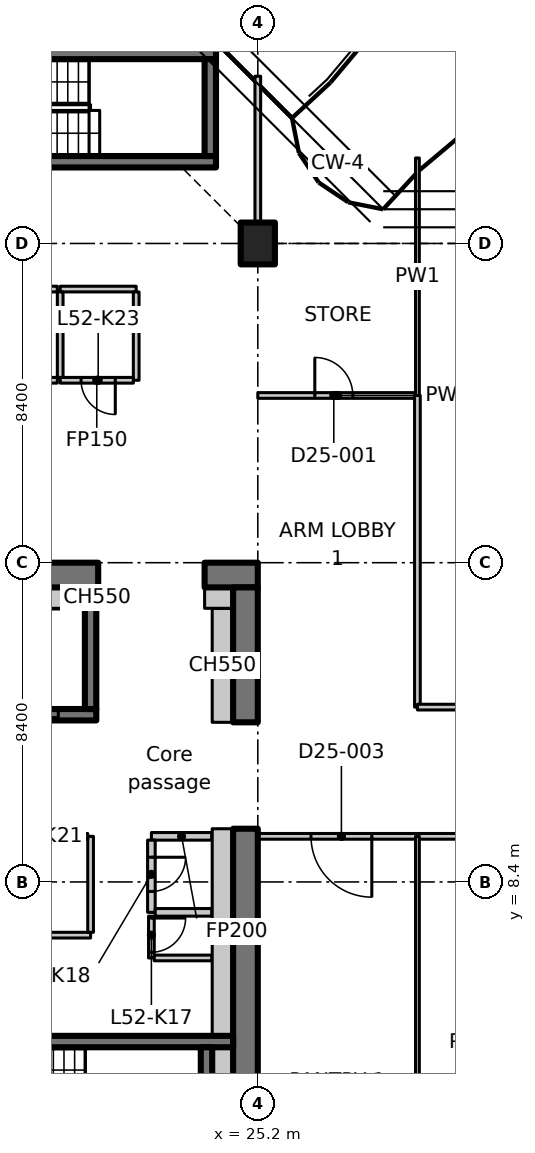
"""IFC4 building model, lengths in metres.
Left out: names, types, materials, properties, quantities, classifications, styles, units other than length and angle.
Written with IfcOpenShell. Run it as: python <this file> out.ifc"""

import sys

from ifc_helpers import new_model, si_unit, direction, frame, frame_2d, origin, origin_2d, place, context, subcontext, project, spatial, polyline, rectangle, outline, extrude, element, fill, save


model = new_model("IFC4")
c1 = context("Model", 3, precision=1e-05, world=origin(), true_north=direction((0.0, 1.0)))
c2 = subcontext(c1, "Body", "Model", "MODEL_VIEW")
j1 = project(units=[si_unit("LENGTHUNIT", "METRE"), si_unit("PLANEANGLEUNIT", "RADIAN")], contexts=[c1])
p1 = place(None, origin())
s1 = spatial("IfcSite", under=j1, at=p1, CompositionType="ELEMENT")
p2 = place(p1, origin())
s2 = spatial("IfcBuilding", under=s1, at=p2, CompositionType="ELEMENT")
p3 = place(p2, frame((0.0, 0.0, 206.4)))
s3 = spatial("IfcBuildingStorey", under=s2, at=p3, CompositionType="ELEMENT", Elevation=206.4)
p4 = place(p3, frame((25.2, 25.2, 0.0), z_axis=(0.0, 0.0, 1.0), x_axis=(1.0, 0.0, 0.0)))
e1 = element("IfcColumn", 1, at=p4, inside=s3, PredefinedType="COLUMN", context=c2, shape_type="SweptSolid", body=[
    extrude(rectangle(XDim=0.9, YDim=1.1, at=origin_2d()), origin(), (0.0, 0.0, 1.0), 4.2),
])
p5 = place(p3, frame((-1.1, 16.475, 0.0), z_axis=(0.0, 0.0, 1.0), x_axis=(1.0, 0.0, 0.0)))
e2 = element("IfcWall", 2, at=p5, inside=s3, PredefinedType="SHEAR", context=c2, shape_type="SweptSolid", body=[
    extrude(rectangle(XDim=22.1, YDim=0.65, at=frame_2d((11.05, 0.0))), origin(), (0.0, 0.0, 1.0), 4.2),
])
p6 = place(p5, frame((3.15, 0.0, 0.0)))
e3 = element("IfcOpeningElement", 3, at=p6, cuts=e2, PredefinedType="OPENING", context=c2, shape_type="SweptSolid", body=[
    extrude(rectangle(XDim=1.1, YDim=2.3, at=frame_2d((0.55, 1.15))), frame((0.0, 0.335, 0.0), z_axis=(0.0, -1.0, 0.0), x_axis=(1.0, 0.0, 0.0)), (0.0, 0.0, 1.0), 0.67),
])
p7 = place(p3, frame((23.8, 16.475, 0.0), z_axis=(0.0, 0.0, 1.0), x_axis=(1.0, 0.0, 0.0)))
e4 = element("IfcWall", 4, at=p7, inside=s3, PredefinedType="SHEAR", context=c2, shape_type="SweptSolid", body=[
    extrude(rectangle(XDim=1.4, YDim=0.65, at=frame_2d((0.7, 0.0))), origin(), (0.0, 0.0, 1.0), 4.2),
])
p8 = place(p3, frame((24.875, 0.65, 0.0), z_axis=(0.0, 0.0, 1.0), x_axis=(0.0, 1.0, 0.0)))
e5 = element("IfcWall", 5, at=p8, inside=s3, PredefinedType="SHEAR", context=c2, shape_type="SweptSolid", body=[
    extrude(rectangle(XDim=9.15, YDim=0.65, at=frame_2d((4.575, 0.0))), origin(), (0.0, 0.0, 1.0), 4.2),
])
p9 = place(p3, frame((24.875, 12.6, 0.0), z_axis=(0.0, 0.0, 1.0), x_axis=(0.0, 1.0, 0.0)))
e6 = element("IfcWall", 6, at=p9, inside=s3, PredefinedType="SHEAR", context=c2, shape_type="SweptSolid", body=[
    extrude(rectangle(XDim=3.55, YDim=0.65, at=frame_2d((1.775, 0.0))), origin(), (0.0, 0.0, 1.0), 4.2),
])
p10 = place(p3, frame((24.275, 12.6, 0.0), z_axis=(0.0, 0.0, 1.0), x_axis=(0.0, 1.0, 0.0)))
e7 = element("IfcWall", 7, at=p10, inside=s3, PredefinedType="PARTITIONING", context=c2, shape_type="SweptSolid", body=[
    extrude(rectangle(XDim=3.0, YDim=0.55, at=frame_2d((1.5, 0.0))), origin(), (0.0, 0.0, 1.0), 4.2),
])
p11 = place(p3, frame((23.8, 15.875, 0.0), z_axis=(0.0, 0.0, 1.0), x_axis=(1.0, 0.0, 0.0)))
e8 = element("IfcWall", 8, at=p11, inside=s3, PredefinedType="PARTITIONING", context=c2, shape_type="SweptSolid", body=[
    extrude(rectangle(XDim=0.75, YDim=0.55, at=frame_2d((0.375, 0.0))), origin(), (0.0, 0.0, 1.0), 4.2),
])
p12 = place(p3, frame((17.85, 12.8, 0.0), z_axis=(0.0, 0.0, 1.0), x_axis=(1.0, 0.0, 0.0)))
e9 = element("IfcWall", 9, at=p12, inside=s3, PredefinedType="SHEAR", context=c2, shape_type="SweptSolid", body=[
    extrude(rectangle(XDim=3.1, YDim=0.3, at=frame_2d((1.55, 0.0))), origin(), (0.0, 0.0, 1.0), 4.2),
])
p13 = place(p12, frame((1.0, 0.0, 0.0)))
e10 = element("IfcOpeningElement", 10, at=p13, cuts=e9, PredefinedType="OPENING", context=c2, shape_type="SweptSolid", body=[
    extrude(rectangle(XDim=1.1, YDim=2.3, at=frame_2d((0.55, 1.15))), frame((0.0, 0.16, 0.0), z_axis=(0.0, -1.0, 0.0), x_axis=(1.0, 0.0, 0.0)), (0.0, 0.0, 1.0), 0.32),
])
p14 = place(p3, frame((20.8, 12.95, 0.0), z_axis=(0.0, 0.0, 1.0), x_axis=(0.0, 1.0, 0.0)))
e11 = element("IfcWall", 11, at=p14, inside=s3, PredefinedType="SHEAR", context=c2, shape_type="SweptSolid", body=[
    extrude(rectangle(XDim=3.2, YDim=0.3, at=frame_2d((1.6, 0.0))), origin(), (0.0, 0.0, 1.0), 4.2),
])
p15 = place(p3, frame((15.8, 4.2, 0.0), z_axis=(0.0, 0.0, 1.0), x_axis=(1.0, 0.0, 0.0)))
e12 = element("IfcWall", 12, at=p15, inside=s3, PredefinedType="SHEAR", context=c2, shape_type="SweptSolid", body=[
    extrude(rectangle(XDim=8.75, YDim=0.3, at=frame_2d((4.375, 0.0))), origin(), (0.0, 0.0, 1.0), 4.2),
])
p16 = place(p15, frame((0.4, 0.0, 0.0)))
e13 = element("IfcOpeningElement", 13, at=p16, cuts=e12, PredefinedType="OPENING", context=c2, shape_type="SweptSolid", body=[
    extrude(rectangle(XDim=1.0, YDim=2.1, at=frame_2d((0.5, 1.05))), frame((0.0, 0.16, 0.0), z_axis=(0.0, -1.0, 0.0), x_axis=(1.0, 0.0, 0.0)), (0.0, 0.0, 1.0), 0.32),
])
p17 = place(p3, frame((23.85, 1.5, 0.0), z_axis=(0.0, 0.0, 1.0), x_axis=(0.0, 1.0, 0.0)))
e14 = element("IfcWall", 14, at=p17, inside=s3, PredefinedType="SHEAR", context=c2, shape_type="SweptSolid", body=[
    extrude(rectangle(XDim=2.55, YDim=0.3, at=frame_2d((1.275, 0.0))), origin(), (0.0, 0.0, 1.0), 4.2),
])
for number, where, z_axis, x_axis in (
    (15, (15.9, 27.35, 0.0), (0.0, 0.0, 1.0), (1.0, 0.0, 0.0)),
    (16, (15.9, 30.2, 0.0), (0.0, 0.0, 1.0), (1.0, 0.0, 0.0)),
):
    element("IfcWall", number, at=place(p3, frame(where, z_axis=z_axis, x_axis=x_axis)), inside=s3, PredefinedType="SHEAR", context=c2, shape_type="SweptSolid", body=[
        extrude(rectangle(XDim=8.2, YDim=0.3, at=frame_2d((4.1, 0.0))), origin(), (0.0, 0.0, 1.0), 4.2),
    ])
p18 = place(p3, frame((23.95, 27.5, 0.0), z_axis=(0.0, 0.0, 1.0), x_axis=(0.0, 1.0, 0.0)))
e17 = element("IfcWall", 17, at=p18, inside=s3, PredefinedType="SHEAR", context=c2, shape_type="SweptSolid", body=[
    extrude(rectangle(XDim=2.55, YDim=0.3, at=frame_2d((1.275, 0.0))), origin(), (0.0, 0.0, 1.0), 4.2),
])
p19 = place(p3, frame((23.988, 9.6, 0.0), z_axis=(0.0, 0.0, 1.0), x_axis=(-1.0, 0.0, 0.0)))
e18 = element("IfcWall", 18, at=p19, inside=s3, PredefinedType="PARTITIONING", context=c2, shape_type="SweptSolid", body=[
    extrude(rectangle(XDim=1.588, YDim=0.2, at=frame_2d((0.794, 0.0))), origin(), (0.0, 0.0, 1.0), 4.2),
])
p20 = place(p3, frame((22.4, 9.5, 0.0), z_axis=(0.0, 0.0, 1.0), x_axis=(0.0, -1.0, 0.0)))
e19 = element("IfcWall", 19, at=p20, inside=s3, PredefinedType="PARTITIONING", context=c2, shape_type="SweptSolid", body=[
    extrude(rectangle(XDim=1.9, YDim=0.2, at=frame_2d((0.95, 0.0))), origin(), (0.0, 0.0, 1.0), 4.2),
])
p21 = place(p20, frame((0.45, 0.0, 0.0)))
e20 = element("IfcOpeningElement", 20, at=p21, cuts=e19, PredefinedType="OPENING", context=c2, shape_type="SweptSolid", body=[
    extrude(rectangle(XDim=0.9, YDim=2.1, at=frame_2d((0.45, 1.05))), frame((0.0, 0.11, 0.0), z_axis=(0.0, -1.0, 0.0), x_axis=(1.0, 0.0, 0.0)), (0.0, 0.0, 1.0), 0.22),
])
p22 = place(p3, frame((22.5, 7.6, 0.0), z_axis=(0.0, 0.0, 1.0), x_axis=(1.0, 0.0, 0.0)))
e21 = element("IfcWall", 21, at=p22, inside=s3, PredefinedType="PARTITIONING", context=c2, shape_type="SweptSolid", body=[
    extrude(rectangle(XDim=1.488, YDim=0.2, at=frame_2d((0.744, 0.0))), origin(), (0.0, 0.0, 1.0), 4.2),
])
p23 = place(p3, frame((12.5, 7.0, 0.0), z_axis=(0.0, 0.0, 1.0), x_axis=(1.0, 0.0, 0.0)))
e22 = element("IfcWall", 22, at=p23, inside=s3, PredefinedType="PARTITIONING", context=c2, shape_type="SweptSolid", body=[
    extrude(rectangle(XDim=8.3, YDim=0.15, at=frame_2d((4.15, 0.0))), origin(), (0.0, 0.0, 1.0), 4.2),
])
p24 = place(p3, frame((20.8, 7.075, 0.0), z_axis=(0.0, 0.0, 1.0), x_axis=(0.0, 1.0, 0.0)))
e23 = element("IfcWall", 23, at=p24, inside=s3, PredefinedType="PARTITIONING", context=c2, shape_type="SweptSolid", body=[
    extrude(rectangle(XDim=2.525, YDim=0.15, at=frame_2d((1.263, 0.0))), origin(), (0.0, 0.0, 1.0), 4.2),
])
p25 = place(p3, frame((20.725, 9.6, 0.0), z_axis=(0.0, 0.0, 1.0), x_axis=(-1.0, 0.0, 0.0)))
e24 = element("IfcWall", 24, at=p25, inside=s3, PredefinedType="PARTITIONING", context=c2, shape_type="SweptSolid", body=[
    extrude(rectangle(XDim=8.225, YDim=0.15, at=frame_2d((4.113, 0.0))), origin(), (0.0, 0.0, 1.0), 4.2),
])
p26 = place(p25, frame((3.675, 0.0, 0.0)))
e25 = element("IfcOpeningElement", 25, at=p26, cuts=e24, PredefinedType="OPENING", context=c2, shape_type="SweptSolid", body=[
    extrude(rectangle(XDim=0.9, YDim=2.1, at=frame_2d((0.45, 1.05))), frame((0.0, 0.085, 0.0), z_axis=(0.0, -1.0, 0.0), x_axis=(1.0, 0.0, 0.0)), (0.0, 0.0, 1.0), 0.17),
])
p27 = place(p3, frame((20.0, 24.0, 0.0), z_axis=(0.0, 0.0, 1.0), x_axis=(1.0, 0.0, 0.0)))
e26 = element("IfcWall", 26, at=p27, inside=s3, PredefinedType="PARTITIONING", context=c2, shape_type="SweptSolid", body=[
    extrude(rectangle(XDim=2.0, YDim=0.15, at=frame_2d((1.0, 0.0))), origin(), (0.0, 0.0, 1.0), 4.2),
])
p28 = place(p3, frame((22.0, 23.925, 0.0), z_axis=(0.0, 0.0, 1.0), x_axis=(0.0, -1.0, 0.0)))
e27 = element("IfcWall", 27, at=p28, inside=s3, PredefinedType="PARTITIONING", context=c2, shape_type="SweptSolid", body=[
    extrude(rectangle(XDim=2.325, YDim=0.15, at=frame_2d((1.163, 0.0))), origin(), (0.0, 0.0, 1.0), 4.2),
])
p29 = place(p3, frame((21.925, 21.6, 0.0), z_axis=(0.0, 0.0, 1.0), x_axis=(-1.0, 0.0, 0.0)))
e28 = element("IfcWall", 28, at=p29, inside=s3, PredefinedType="PARTITIONING", context=c2, shape_type="SweptSolid", body=[
    extrude(rectangle(XDim=1.925, YDim=0.15, at=frame_2d((0.962, 0.0))), origin(), (0.0, 0.0, 1.0), 4.2),
])
p30 = place(p29, frame((0.475, 0.0, 0.0)))
e29 = element("IfcOpeningElement", 29, at=p30, cuts=e28, PredefinedType="OPENING", context=c2, shape_type="SweptSolid", body=[
    extrude(rectangle(XDim=0.9, YDim=2.1, at=frame_2d((0.45, 1.05))), frame((0.0, 0.085, 0.0), z_axis=(0.0, -1.0, 0.0), x_axis=(1.0, 0.0, 0.0)), (0.0, 0.0, 1.0), 0.17),
])
p31 = place(p3, frame((20.0, 21.675, 0.0), z_axis=(0.0, 0.0, 1.0), x_axis=(0.0, 1.0, 0.0)))
e30 = element("IfcWall", 30, at=p31, inside=s3, PredefinedType="PARTITIONING", context=c2, shape_type="SweptSolid", body=[
    extrude(rectangle(XDim=2.25, YDim=0.15, at=frame_2d((1.125, 0.0))), origin(), (0.0, 0.0, 1.0), 4.2),
])
p32 = place(p3, frame((19.925, 21.6, 0.0), z_axis=(0.0, 0.0, 1.0), x_axis=(-1.0, 0.0, 0.0)))
e31 = element("IfcWall", 31, at=p32, inside=s3, PredefinedType="PARTITIONING", context=c2, shape_type="SweptSolid", body=[
    extrude(rectangle(XDim=2.325, YDim=0.15, at=frame_2d((1.163, 0.0))), origin(), (0.0, 0.0, 1.0), 4.2),
])
p33 = place(p32, frame((0.675, 0.0, 0.0)))
e32 = element("IfcOpeningElement", 32, at=p33, cuts=e31, PredefinedType="OPENING", context=c2, shape_type="SweptSolid", body=[
    extrude(rectangle(XDim=0.9, YDim=2.1, at=frame_2d((0.45, 1.05))), frame((0.0, 0.085, 0.0), z_axis=(0.0, -1.0, 0.0), x_axis=(1.0, 0.0, 0.0)), (0.0, 0.0, 1.0), 0.17),
])
p34 = place(p3, frame((17.675, 24.0, 0.0), z_axis=(0.0, 0.0, 1.0), x_axis=(1.0, 0.0, 0.0)))
e33 = element("IfcWall", 33, at=p34, inside=s3, PredefinedType="PARTITIONING", context=c2, shape_type="SweptSolid", body=[
    extrude(rectangle(XDim=2.25, YDim=0.15, at=frame_2d((1.125, 0.0))), origin(), (0.0, 0.0, 1.0), 4.2),
])
p35 = place(p3, frame((22.4, 7.5, 0.0), z_axis=(0.0, 0.0, 1.0), x_axis=(0.0, -1.0, 0.0)))
e34 = element("IfcWall", 34, at=p35, inside=s3, PredefinedType="PARTITIONING", context=c2, shape_type="SweptSolid", body=[
    extrude(rectangle(XDim=1.1, YDim=0.15, at=frame_2d((0.55, 0.0))), origin(), (0.0, 0.0, 1.0), 4.2),
])
p36 = place(p35, frame((0.05, 0.0, 0.0)))
e35 = element("IfcOpeningElement", 35, at=p36, cuts=e34, PredefinedType="OPENING", context=c2, shape_type="SweptSolid", body=[
    extrude(rectangle(XDim=0.9, YDim=2.1, at=frame_2d((0.45, 1.05))), frame((0.0, 0.085, 0.0), z_axis=(0.0, -1.0, 0.0), x_axis=(1.0, 0.0, 0.0)), (0.0, 0.0, 1.0), 0.17),
])
p37 = place(p3, frame((22.475, 6.4, 0.0), z_axis=(0.0, 0.0, 1.0), x_axis=(1.0, 0.0, 0.0)))
e36 = element("IfcWall", 36, at=p37, inside=s3, PredefinedType="PARTITIONING", context=c2, shape_type="SweptSolid", body=[
    extrude(rectangle(XDim=1.513, YDim=0.15, at=frame_2d((0.756, 0.0))), origin(), (0.0, 0.0, 1.0), 4.2),
])
p38 = place(p3, frame((18.15, 15.875, 0.0), z_axis=(0.0, 0.0, 1.0), x_axis=(1.0, 0.0, 0.0)))
e37 = element("IfcWall", 37, at=p38, inside=s3, PredefinedType="PARTITIONING", context=c2, shape_type="SweptSolid", body=[
    extrude(rectangle(XDim=2.5, YDim=0.55, at=frame_2d((1.25, 0.0))), origin(), (0.0, 0.0, 1.0), 4.2),
])
p39 = place(p3, frame((20.95, 15.875, 0.0), z_axis=(0.0, 0.0, 1.0), x_axis=(1.0, 0.0, 0.0)))
e38 = element("IfcWall", 38, at=p39, inside=s3, PredefinedType="PARTITIONING", context=c2, shape_type="SweptSolid", body=[
    extrude(rectangle(XDim=0.05, YDim=0.55, at=frame_2d((0.025, 0.0))), origin(), (0.0, 0.0, 1.0), 4.2),
])
p40 = place(p3, frame((24.275, 1.5, 0.0), z_axis=(0.0, 0.0, 1.0), x_axis=(0.0, 1.0, 0.0)))
e39 = element("IfcWall", 39, at=p40, inside=s3, PredefinedType="PARTITIONING", context=c2, shape_type="SweptSolid", body=[
    extrude(rectangle(XDim=2.55, YDim=0.55, at=frame_2d((1.275, 0.0))), origin(), (0.0, 0.0, 1.0), 4.2),
])
p41 = place(p3, frame((24.275, 4.35, 0.0), z_axis=(0.0, 0.0, 1.0), x_axis=(0.0, 1.0, 0.0)))
e40 = element("IfcWall", 40, at=p41, inside=s3, PredefinedType="PARTITIONING", context=c2, shape_type="SweptSolid", body=[
    extrude(rectangle(XDim=5.45, YDim=0.55, at=frame_2d((2.725, 0.0))), origin(), (0.0, 0.0, 1.0), 4.2),
])
p42 = place(p3, frame((25.2, 21.2, 0.0), z_axis=(0.0, 0.0, 1.0), x_axis=(1.0, 0.0, 0.0)))
e41 = element("IfcWall", 41, at=p42, inside=s3, PredefinedType="PARTITIONING", context=c2, shape_type="SweptSolid", body=[
    extrude(rectangle(XDim=4.2, YDim=0.15, at=frame_2d((2.1, 0.0))), origin(), (0.0, 0.0, 1.0), 4.18),
])
p43 = place(p42, frame((1.5, 0.0, 0.0)))
e42 = element("IfcOpeningElement", 42, at=p43, cuts=e41, PredefinedType="OPENING", context=c2, shape_type="SweptSolid", body=[
    extrude(rectangle(XDim=1.0, YDim=2.1, at=frame_2d((0.5, 1.05))), frame((0.0, 0.085, 0.0), z_axis=(0.0, -1.0, 0.0), x_axis=(1.0, 0.0, 0.0)), (0.0, 0.0, 1.0), 0.17),
])
p44 = place(p3, frame((29.4, 9.6, 0.0), z_axis=(0.0, 0.0, 1.0), x_axis=(-1.0, 0.0, 0.0)))
e43 = element("IfcWall", 43, at=p44, inside=s3, PredefinedType="PARTITIONING", context=c2, shape_type="SweptSolid", body=[
    extrude(rectangle(XDim=4.2, YDim=0.15, at=frame_2d((2.1, 0.0))), origin(), (0.0, 0.0, 1.0), 4.18),
])
p45 = place(p44, frame((1.2, 0.0, 0.0)))
e44 = element("IfcOpeningElement", 44, at=p45, cuts=e43, PredefinedType="OPENING", context=c2, shape_type="SweptSolid", body=[
    extrude(rectangle(XDim=1.6, YDim=2.1, at=frame_2d((0.8, 1.05))), frame((0.0, 0.085, 0.0), z_axis=(0.0, -1.0, 0.0), x_axis=(1.0, 0.0, 0.0)), (0.0, 0.0, 1.0), 0.17),
])
p46 = place(p3, frame((29.4, 21.2, 0.0), z_axis=(0.0, 0.0, 1.0), x_axis=(0.0, -1.0, 0.0)))
e45 = element("IfcWall", 45, at=p46, inside=s3, PredefinedType="PARTITIONING", context=c2, shape_type="SweptSolid", body=[
    extrude(rectangle(XDim=8.2, YDim=0.15, at=frame_2d((4.1, 0.0))), origin(), (0.0, 0.0, 1.0), 4.18),
])
p47 = place(p3, frame((29.4, 27.449, 0.0), z_axis=(0.0, 0.0, 1.0), x_axis=(0.0, -1.0, 0.0)))
e46 = element("IfcWall", 46, at=p47, inside=s3, PredefinedType="PARTITIONING", context=c2, shape_type="SweptSolid", body=[
    extrude(outline(polyline([(0.0, 0.0), (6.25, 0.0), (6.249, 4.18), (2.699, 4.18), (2.697, 3.83), (1.801, 3.83), (1.799, 4.18), (0.174, 4.18), (0.0, 4.18), (0.0, 0.0)])), frame((0.0, 0.05, 0.0), z_axis=(0.0, -1.0, 0.0), x_axis=(1.0, 0.0, 0.0)), (0.0, 0.0, 1.0), 0.1),
])
p48 = place(p3, frame((25.2, 25.77, 0.0), z_axis=(0.0, 0.0, 1.0), x_axis=(0.0, 1.0, 0.0)))
e47 = element("IfcWall", 47, at=p48, inside=s3, PredefinedType="PARTITIONING", context=c2, shape_type="SweptSolid", body=[
    extrude(rectangle(XDim=3.83, YDim=0.15, at=frame_2d((1.915, 0.0))), origin(), (0.0, 0.0, 1.0), 3.83),
])
p49 = place(p3, frame((33.6, 9.6, 0.0), z_axis=(0.0, 0.0, 1.0), x_axis=(-1.0, 0.0, 0.0)))
e48 = element("IfcWall", 48, at=p49, inside=s3, PredefinedType="PARTITIONING", context=c2, shape_type="SweptSolid", body=[
    extrude(rectangle(XDim=4.2, YDim=0.15, at=frame_2d((2.1, 0.0))), origin(), (0.0, 0.0, 1.0), 4.18),
])
p50 = place(p49, frame((1.5, 0.0, 0.0)))
e49 = element("IfcOpeningElement", 49, at=p50, cuts=e48, PredefinedType="OPENING", context=c2, shape_type="SweptSolid", body=[
    extrude(rectangle(XDim=1.1, YDim=2.1, at=frame_2d((0.55, 1.05))), frame((0.0, 0.085, 0.0), z_axis=(0.0, -1.0, 0.0), x_axis=(1.0, 0.0, 0.0)), (0.0, 0.0, 1.0), 0.17),
])
p51 = place(p3, frame((29.4, 13.0, 0.0), z_axis=(0.0, 0.0, 1.0), x_axis=(1.0, 0.0, 0.0)))
e50 = element("IfcWall", 50, at=p51, inside=s3, PredefinedType="PARTITIONING", context=c2, shape_type="SweptSolid", body=[
    extrude(rectangle(XDim=11.8, YDim=0.15, at=frame_2d((5.9, 0.0))), origin(), (0.0, 0.0, 1.0), 4.18),
])
p52 = place(p51, frame((4.8, 0.0, 0.0)))
e51 = element("IfcOpeningElement", 51, at=p52, cuts=e50, PredefinedType="OPENING", context=c2, shape_type="SweptSolid", body=[
    extrude(rectangle(XDim=2.0, YDim=2.4, at=frame_2d((1.0, 1.2))), frame((0.0, 0.085, 0.0), z_axis=(0.0, -1.0, 0.0), x_axis=(1.0, 0.0, 0.0)), (0.0, 0.0, 1.0), 0.17),
])
p53 = place(p3, frame((29.4, 9.6, 0.0), z_axis=(0.0, 0.0, 1.0), x_axis=(0.0, -1.0, 0.0)))
e52 = element("IfcWall", 52, at=p53, inside=s3, PredefinedType="PARTITIONING", context=c2, shape_type="SweptSolid", body=[
    extrude(outline(polyline([(0.0, 0.0), (12.6, 0.0), (12.6, 4.18), (10.05, 4.18), (10.048, 3.83), (9.152, 3.83), (9.15, 4.18), (0.0, 4.18), (0.0, 0.0)])), frame((0.0, 0.05, 0.0), z_axis=(0.0, -1.0, 0.0), x_axis=(1.0, 0.0, 0.0)), (0.0, 0.0, 1.0), 0.1),
])
p54 = place(p13, origin())
e53 = element("IfcDoor", 53, at=p54, inside=s3, OperationType="SLIDING_TO_LEFT", PredefinedType="DOOR", context=c2, shape_type="SweptSolid", body=[
    extrude(rectangle(XDim=1.1, YDim=2.3, at=frame_2d((0.55, 1.15))), frame((0.0, 0.025, 0.0), z_axis=(0.0, -1.0, 0.0), x_axis=(1.0, 0.0, 0.0)), (0.0, 0.0, 1.0), 0.05),
])
fill(e10, e53)
p55 = place(p36, origin())
e54 = element("IfcDoor", 54, at=p55, inside=s3, OperationType="SINGLE_SWING_RIGHT", PredefinedType="DOOR", context=c2, shape_type="SweptSolid", body=[
    extrude(rectangle(XDim=0.9, YDim=2.1, at=frame_2d((0.45, 1.05))), frame((0.0, 0.025, 0.0), z_axis=(0.0, -1.0, 0.0), x_axis=(1.0, 0.0, 0.0)), (0.0, 0.0, 1.0), 0.05),
])
fill(e35, e54)
p56 = place(p21, origin())
e55 = element("IfcDoor", 55, at=p56, inside=s3, OperationType="SINGLE_SWING_LEFT", PredefinedType="DOOR", context=c2, shape_type="SweptSolid", body=[
    extrude(rectangle(XDim=0.9, YDim=2.1, at=frame_2d((0.45, 1.05))), frame((0.0, 0.025, 0.0), z_axis=(0.0, -1.0, 0.0), x_axis=(1.0, 0.0, 0.0)), (0.0, 0.0, 1.0), 0.05),
])
fill(e20, e55)
p57 = place(p30, origin())
e56 = element("IfcDoor", 56, at=p57, inside=s3, OperationType="SINGLE_SWING_RIGHT", PredefinedType="DOOR", context=c2, shape_type="SweptSolid", body=[
    extrude(rectangle(XDim=0.9, YDim=2.1, at=frame_2d((0.45, 1.05))), frame((0.0, 0.025, 0.0), z_axis=(0.0, -1.0, 0.0), x_axis=(1.0, 0.0, 0.0)), (0.0, 0.0, 1.0), 0.05),
])
fill(e29, e56)
p58 = place(p43, origin())
e57 = element("IfcDoor", 57, at=p58, inside=s3, OperationType="SINGLE_SWING_LEFT", PredefinedType="DOOR", context=c2, shape_type="SweptSolid", body=[
    extrude(rectangle(XDim=1.0, YDim=2.1, at=frame_2d((0.5, 1.05))), frame((0.0, 0.025, 0.0), z_axis=(0.0, -1.0, 0.0), x_axis=(1.0, 0.0, 0.0)), (0.0, 0.0, 1.0), 0.05),
])
fill(e42, e57)
p59 = place(p45, origin())
e58 = element("IfcDoor", 58, at=p59, inside=s3, OperationType="DOUBLE_DOOR_SINGLE_SWING", PredefinedType="DOOR", context=c2, shape_type="SweptSolid", body=[
    extrude(rectangle(XDim=1.6, YDim=2.1, at=frame_2d((0.8, 1.05))), frame((0.0, 0.025, 0.0), z_axis=(0.0, -1.0, 0.0), x_axis=(1.0, 0.0, 0.0)), (0.0, 0.0, 1.0), 0.05),
])
fill(e44, e58)
save(model, sys.argv[1])
